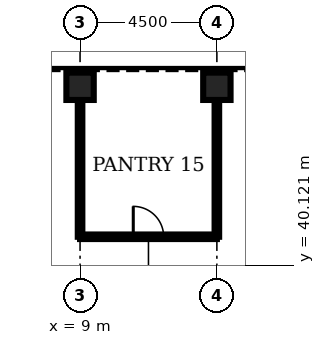
"""IFC4 building model, lengths in metres.
Left out: names, types, materials, properties, quantities, classifications, styles, units other than length and angle.
Written with IfcOpenShell. Run it as: python <this file> out.ifc"""

import sys

from ifc_helpers import new_model, si_unit, direction, frame, frame_2d, origin, origin_2d, place, context, subcontext, project, spatial, rectangle, hollow_rectangle, extrude, element, fill, save


model = new_model("IFC4")
c1 = context("Model", 3, precision=1e-05, world=origin(), true_north=direction((0.0, 1.0)))
c2 = subcontext(c1, "Body", "Model", "MODEL_VIEW")
j1 = project(units=[si_unit("LENGTHUNIT", "METRE"), si_unit("PLANEANGLEUNIT", "RADIAN")], contexts=[c1])
p1 = place(None, origin())
s1 = spatial("IfcSite", under=j1, at=p1, CompositionType="ELEMENT")
p2 = place(p1, origin())
s2 = spatial("IfcBuilding", under=s1, at=p2, CompositionType="ELEMENT")
p3 = place(p2, frame((0.0, 0.0, 81.5)))
s3 = spatial("IfcBuildingStorey", under=s2, at=p3, CompositionType="ELEMENT", Elevation=81.5)
for number, where, z_axis, x_axis in (
    (1, (13.5, 46.0, 0.0), (0.0, 0.0, 1.0), (0.0, 1.0, 0.0)),
    (2, (9.0, 46.0, 0.0), (0.0, 0.0, 1.0), (0.0, 1.0, 0.0)),
):
    element("IfcColumn", number, at=place(p3, frame(where, z_axis=z_axis, x_axis=x_axis)), inside=s3, PredefinedType="COLUMN", context=c2, shape_type="SweptSolid", body=[
        extrude(hollow_rectangle(XDim=0.9, YDim=0.9, WallThickness=0.11, at=origin_2d()), origin(), (0.0, 0.0, 1.0), 4.5),
    ])
p4 = place(p3, frame((9.0, 41.05, 0.0), z_axis=(0.0, 0.0, 1.0), x_axis=(1.0, 0.0, 0.0)))
e3 = element("IfcWall", 3, at=p4, inside=s3, PredefinedType="PARTITIONING", context=c2, shape_type="SweptSolid", body=[
    extrude(rectangle(XDim=4.5, YDim=0.15, at=frame_2d((2.25, 0.0))), origin(), (0.0, 0.0, 1.0), 3.0),
])
p5 = place(p4, frame((1.75, 0.0, 0.0)))
e4 = element("IfcOpeningElement", 4, at=p5, cuts=e3, PredefinedType="OPENING", context=c2, shape_type="SweptSolid", body=[
    extrude(rectangle(XDim=1.0, YDim=2.1, at=frame_2d((0.5, 1.05))), frame((0.0, 0.085, 0.0), z_axis=(0.0, -1.0, 0.0), x_axis=(1.0, 0.0, 0.0)), (0.0, 0.0, 1.0), 0.17),
])
for number, where, z_axis, x_axis in (
    (5, (9.0, 41.05, 0.0), (0.0, 0.0, 1.0), (0.0, 1.0, 0.0)),
    (6, (13.5, 41.05, 0.0), (0.0, 0.0, 1.0), (0.0, 1.0, 0.0)),
):
    element("IfcWall", number, at=place(p3, frame(where, z_axis=z_axis, x_axis=x_axis)), inside=s3, PredefinedType="PARTITIONING", context=c2, shape_type="SweptSolid", body=[
        extrude(rectangle(XDim=4.5, YDim=0.15, at=frame_2d((2.25, 0.0))), origin(), (0.0, 0.0, 1.0), 3.0),
    ])
p6 = place(p5, origin())
e7 = element("IfcDoor", 7, at=p6, inside=s3, OperationType="SINGLE_SWING_LEFT", PredefinedType="DOOR", context=c2, shape_type="SweptSolid", body=[
    extrude(rectangle(XDim=1.0, YDim=2.1, at=frame_2d((0.5, 1.05))), frame((0.0, 0.025, 0.0), z_axis=(0.0, -1.0, 0.0), x_axis=(1.0, 0.0, 0.0)), (0.0, 0.0, 1.0), 0.05),
])
fill(e4, e7)
save(model, sys.argv[1])
